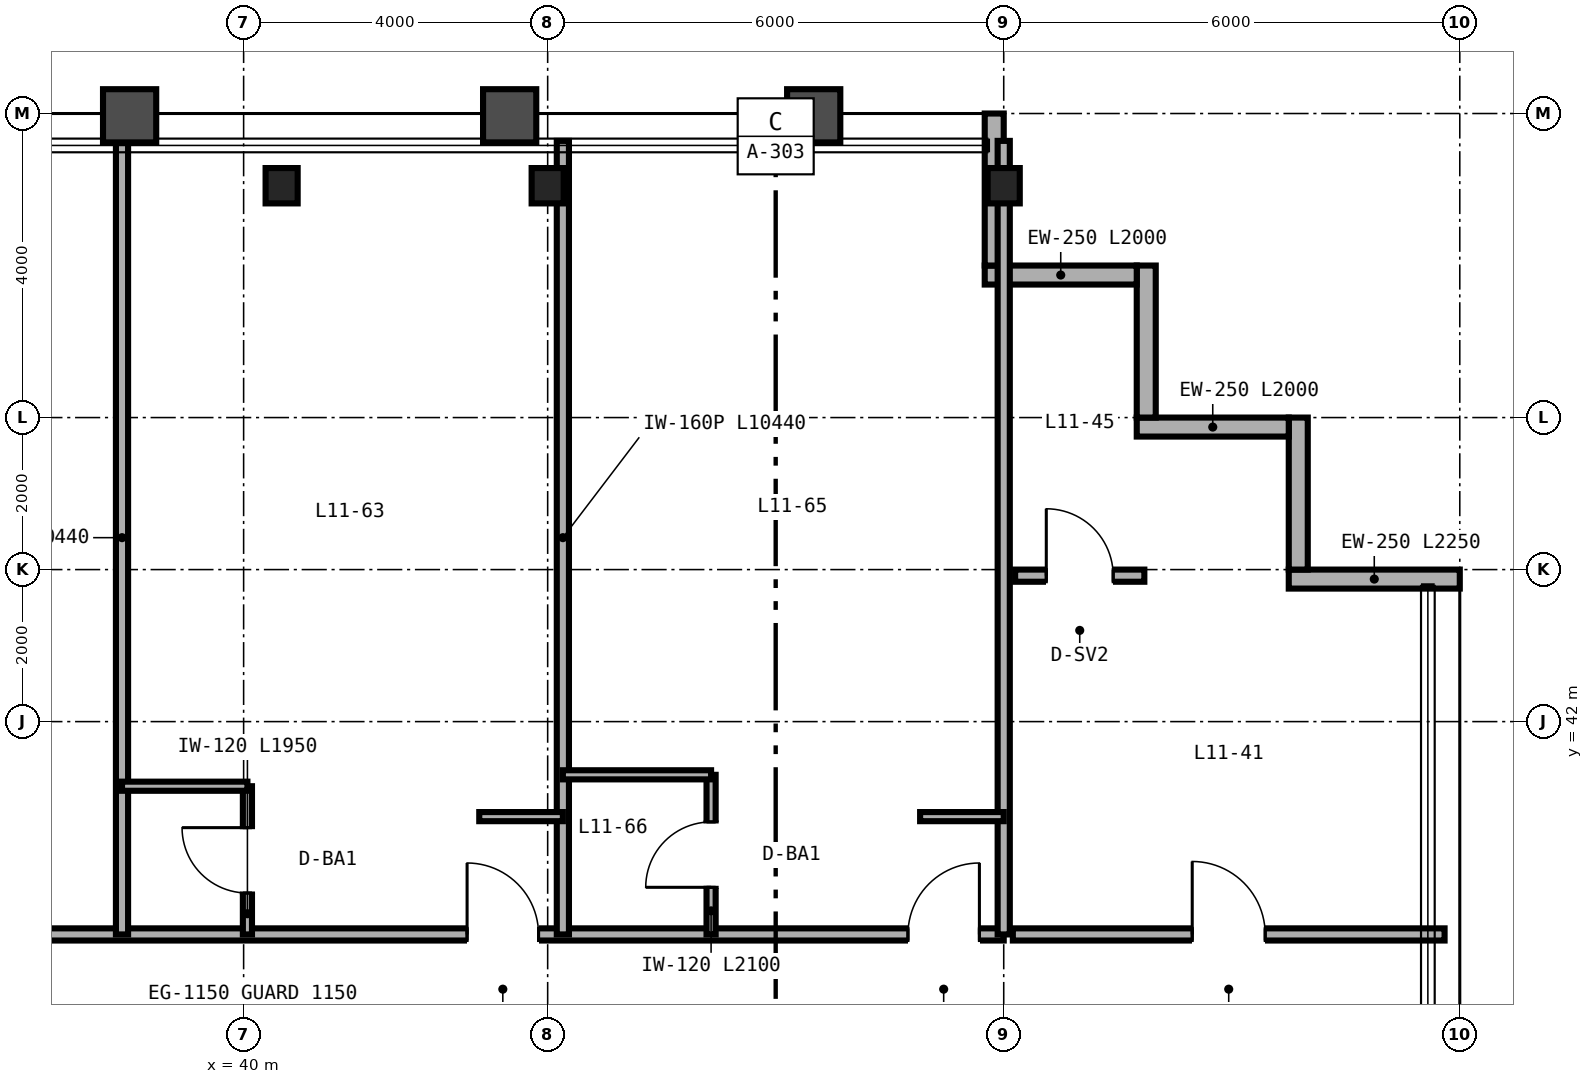
"""IFC4 building model, lengths in metres.
Left out: names, types, materials, properties, quantities, classifications, styles, units other than length and angle.
Written with IfcOpenShell. Run it as: python <this file> out.ifc"""

import sys

from ifc_helpers import new_model, si_unit, direction, frame, frame_2d, origin, origin_2d, place, context, subcontext, project, spatial, rectangle, i_section, extrude, source, transform, mapped, element, fill, save


model = new_model("IFC4")
c1 = context("Model", 3, precision=1e-05, world=origin(), true_north=direction((0.0, 1.0)))
c2 = subcontext(c1, "Body", "Model", "MODEL_VIEW")
j1 = project(units=[si_unit("LENGTHUNIT", "METRE"), si_unit("PLANEANGLEUNIT", "RADIAN")], contexts=[c1])
p1 = place(None, origin())
s1 = spatial("IfcSite", under=j1, at=p1, CompositionType="ELEMENT")
p2 = place(p1, origin())
s2 = spatial("IfcBuilding", under=s1, at=p2, CompositionType="ELEMENT")
p3 = place(p2, frame((0.0, 0.0, 49.2)))
s3 = spatial("IfcBuildingStorey", under=s2, at=p3, CompositionType="ELEMENT", Elevation=49.2)
m1 = source(origin(), c2, "Body", "SweptSolid", [
    extrude(i_section(OverallWidth=0.422, OverallDepth=0.465, WebThickness=0.045, FlangeThickness=0.073, FilletRadius=0.025, at=origin_2d()), origin(), (0.0, 0.0, 1.0), 3.35),
])
for number, where, z_axis, x_axis in (
    (1, (40.5, 49.05, 0.0), (0.0, 0.0, 1.0), (1.0, 0.0, 0.0)),
    (2, (44.0, 49.05, 0.0), (0.0, 0.0, 1.0), (1.0, 0.0, 0.0)),
    (3, (50.0, 49.05, 0.0), (0.0, 0.0, 1.0), (1.0, 0.0, 0.0)),
):
    element("IfcColumn", number, at=place(p3, frame(where, z_axis=z_axis, x_axis=x_axis)), inside=s3, PredefinedType="COLUMN", context=c2, shape_type="MappedRepresentation", body=[
        mapped(m1, transform((0.0, 0.0, 0.0), scale=1.0)),
    ])
p4 = place(p3, frame((56.0, 43.875, 0.0), z_axis=(0.0, 0.0, 1.0), x_axis=(-1.0, 0.0, 0.0)))
e4 = element("IfcWall", 4, at=p4, inside=s3, PredefinedType="SOLIDWALL", context=c2, shape_type="SweptSolid", body=[
    extrude(rectangle(XDim=2.25, YDim=0.25, at=frame_2d((1.125, 0.0))), origin(), (0.0, 0.0, 1.0), 3.35),
])
for number, where, z_axis, x_axis in (
    (5, (53.875, 44.0, 0.0), (0.0, 0.0, 1.0), (0.0, 1.0, 0.0)),
    (6, (53.75, 45.875, 0.0), (0.0, 0.0, 1.0), (-1.0, 0.0, 0.0)),
    (7, (51.875, 46.0, 0.0), (0.0, 0.0, 1.0), (0.0, 1.0, 0.0)),
    (8, (51.75, 47.875, 0.0), (0.0, 0.0, 1.0), (-1.0, 0.0, 0.0)),
):
    element("IfcWall", number, at=place(p3, frame(where, z_axis=z_axis, x_axis=x_axis)), inside=s3, PredefinedType="SOLIDWALL", context=c2, shape_type="SweptSolid", body=[
        extrude(rectangle(XDim=2.0, YDim=0.25, at=frame_2d((1.0, 0.0))), origin(), (0.0, 0.0, 1.0), 3.35),
    ])
p5 = place(p3, frame((49.875, 48.0, 0.0), z_axis=(0.0, 0.0, 1.0), x_axis=(0.0, 1.0, 0.0)))
e9 = element("IfcWall", 9, at=p5, inside=s3, PredefinedType="SOLIDWALL", context=c2, shape_type="SweptSolid", body=[
    extrude(rectangle(XDim=2.0, YDim=0.25, at=frame_2d((1.0, 0.0))), origin(), (0.0, 0.0, 1.0), 2.657),
])
p6 = place(p3, frame((50.12, 39.2, 0.0), z_axis=(0.0, 0.0, 1.0), x_axis=(1.0, 0.0, 0.0)))
e10 = element("IfcWall", 10, at=p6, inside=s3, PredefinedType="PARTITIONING", context=c2, shape_type="SweptSolid", body=[
    extrude(rectangle(XDim=5.68, YDim=0.16, at=frame_2d((2.84, 0.0))), origin(), (0.0, 0.0, 1.0), 3.35),
])
p7 = place(p6, frame((2.36, 0.0, 0.0)))
e11 = element("IfcOpeningElement", 11, at=p7, cuts=e10, PredefinedType="OPENING", context=c2, shape_type="SweptSolid", body=[
    extrude(rectangle(XDim=0.96, YDim=2.15, at=frame_2d((0.48, 1.075))), frame((0.0, 0.09, 0.0), z_axis=(0.0, -1.0, 0.0), x_axis=(1.0, 0.0, 0.0)), (0.0, 0.0, 1.0), 0.18),
])
p8 = place(p3, frame((50.15, 43.92, 0.0), z_axis=(0.0, 0.0, 1.0), x_axis=(1.0, 0.0, 0.0)))
e12 = element("IfcWall", 12, at=p8, inside=s3, PredefinedType="PARTITIONING", context=c2, shape_type="SweptSolid", body=[
    extrude(rectangle(XDim=1.7, YDim=0.16, at=frame_2d((0.85, 0.0))), origin(), (0.0, 0.0, 1.0), 3.35),
])
p9 = place(p8, frame((0.41, 0.0, 0.0)))
e13 = element("IfcOpeningElement", 13, at=p9, cuts=e12, PredefinedType="OPENING", context=c2, shape_type="SweptSolid", body=[
    extrude(rectangle(XDim=0.88, YDim=2.15, at=frame_2d((0.44, 1.075))), frame((0.0, 0.09, 0.0), z_axis=(0.0, -1.0, 0.0), x_axis=(1.0, 0.0, 0.0)), (0.0, 0.0, 1.0), 0.18),
])
p10 = place(p3, frame((14.0, 39.2, 0.0), z_axis=(0.0, 0.0, 1.0), x_axis=(1.0, 0.0, 0.0)))
e14 = element("IfcWall", 14, at=p10, inside=s3, PredefinedType="PARTITIONING", context=c2, shape_type="SweptSolid", body=[
    extrude(rectangle(XDim=36.0, YDim=0.16, at=frame_2d((18.0, 0.0))), origin(), (0.0, 0.0, 1.0), 2.571),
])
p11 = place(p10, frame((4.54, 0.0, 0.0)))
e15 = element("IfcOpeningElement", 15, at=p11, cuts=e14, PredefinedType="OPENING", context=c2, shape_type="SweptSolid", body=[
    extrude(rectangle(XDim=0.94, YDim=2.15, at=frame_2d((0.47, 1.075))), frame((0.0, 0.09, 0.0), z_axis=(0.0, -1.0, 0.0), x_axis=(1.0, 0.0, 0.0)), (0.0, 0.0, 1.0), 0.18),
])
p12 = place(p10, frame((10.29, 0.0, 0.0)))
e16 = element("IfcOpeningElement", 16, at=p12, cuts=e14, PredefinedType="OPENING", context=c2, shape_type="SweptSolid", body=[
    extrude(rectangle(XDim=0.94, YDim=2.15, at=frame_2d((0.47, 1.075))), frame((0.0, 0.09, 0.0), z_axis=(0.0, -1.0, 0.0), x_axis=(1.0, 0.0, 0.0)), (0.0, 0.0, 1.0), 0.18),
])
p13 = place(p10, frame((16.54, 0.0, 0.0)))
e17 = element("IfcOpeningElement", 17, at=p13, cuts=e14, PredefinedType="OPENING", context=c2, shape_type="SweptSolid", body=[
    extrude(rectangle(XDim=0.94, YDim=2.15, at=frame_2d((0.47, 1.075))), frame((0.0, 0.09, 0.0), z_axis=(0.0, -1.0, 0.0), x_axis=(1.0, 0.0, 0.0)), (0.0, 0.0, 1.0), 0.18),
])
p14 = place(p10, frame((20.62, 0.0, 0.0)))
e18 = element("IfcOpeningElement", 18, at=p14, cuts=e14, PredefinedType="OPENING", context=c2, shape_type="SweptSolid", body=[
    extrude(rectangle(XDim=0.96, YDim=2.15, at=frame_2d((0.48, 1.075))), frame((0.0, 0.09, 0.0), z_axis=(0.0, -1.0, 0.0), x_axis=(1.0, 0.0, 0.0)), (0.0, 0.0, 1.0), 0.18),
])
p15 = place(p10, frame((28.94, 0.0, 0.0)))
e19 = element("IfcOpeningElement", 19, at=p15, cuts=e14, PredefinedType="OPENING", context=c2, shape_type="SweptSolid", body=[
    extrude(rectangle(XDim=0.94, YDim=2.15, at=frame_2d((0.47, 1.075))), frame((0.0, 0.09, 0.0), z_axis=(0.0, -1.0, 0.0), x_axis=(1.0, 0.0, 0.0)), (0.0, 0.0, 1.0), 0.18),
])
p16 = place(p10, frame((34.74, 0.0, 0.0)))
e20 = element("IfcOpeningElement", 20, at=p16, cuts=e14, PredefinedType="OPENING", context=c2, shape_type="SweptSolid", body=[
    extrude(rectangle(XDim=0.94, YDim=2.15, at=frame_2d((0.47, 1.075))), frame((0.0, 0.09, 0.0), z_axis=(0.0, -1.0, 0.0), x_axis=(1.0, 0.0, 0.0)), (0.0, 0.0, 1.0), 0.18),
])
p17 = place(p3, frame((50.0, 39.2, 0.0), z_axis=(0.0, 0.0, 1.0), x_axis=(0.0, 1.0, 0.0)))
e21 = element("IfcWall", 21, at=p17, inside=s3, PredefinedType="PARTITIONING", context=c2, shape_type="SweptSolid", body=[
    extrude(rectangle(XDim=10.44, YDim=0.16, at=frame_2d((5.22, 0.0))), origin(), (0.0, 0.0, 1.0), 2.657),
])
p18 = place(p3, frame((38.4, 39.2, 0.0), z_axis=(0.0, 0.0, 1.0), x_axis=(0.0, 1.0, 0.0)))
e22 = element("IfcWall", 22, at=p18, inside=s3, PredefinedType="PARTITIONING", context=c2, shape_type="SweptSolid", body=[
    extrude(rectangle(XDim=10.44, YDim=0.16, at=frame_2d((5.22, 0.0))), origin(), (0.0, 0.0, 1.0), 2.423),
])
p19 = place(p3, frame((44.2, 39.2, 0.0), z_axis=(0.0, 0.0, 1.0), x_axis=(0.0, 1.0, 0.0)))
e23 = element("IfcWall", 23, at=p19, inside=s3, PredefinedType="PARTITIONING", context=c2, shape_type="SweptSolid", body=[
    extrude(rectangle(XDim=10.44, YDim=0.16, at=frame_2d((5.22, 0.0))), origin(), (0.0, 0.0, 1.0), 2.657),
])
p20 = place(p3, frame((40.05, 39.2, 0.0), z_axis=(0.0, 0.0, 1.0), x_axis=(0.0, 1.0, 0.0)))
e24 = element("IfcWall", 24, at=p20, inside=s3, PredefinedType="PARTITIONING", context=c2, shape_type="SweptSolid", body=[
    extrude(rectangle(XDim=1.95, YDim=0.12, at=frame_2d((0.975, 0.0))), origin(), (0.0, 0.0, 1.0), 3.35),
])
p21 = place(p20, frame((0.545, 0.0, 0.0)))
e25 = element("IfcOpeningElement", 25, at=p21, cuts=e24, PredefinedType="OPENING", context=c2, shape_type="SweptSolid", body=[
    extrude(rectangle(XDim=0.86, YDim=2.1, at=frame_2d((0.43, 1.05))), frame((0.0, 0.07, 0.0), z_axis=(0.0, -1.0, 0.0), x_axis=(1.0, 0.0, 0.0)), (0.0, 0.0, 1.0), 0.14),
])
p22 = place(p3, frame((38.4, 41.15, 0.0), z_axis=(0.0, 0.0, 1.0), x_axis=(1.0, 0.0, 0.0)))
e26 = element("IfcWall", 26, at=p22, inside=s3, PredefinedType="PARTITIONING", context=c2, shape_type="SweptSolid", body=[
    extrude(rectangle(XDim=1.65, YDim=0.12, at=frame_2d((0.825, 0.0))), origin(), (0.0, 0.0, 1.0), 3.35),
])
p23 = place(p3, frame((43.1, 40.75, 0.0), z_axis=(0.0, 0.0, 1.0), x_axis=(1.0, 0.0, 0.0)))
e27 = element("IfcWall", 27, at=p23, inside=s3, PredefinedType="PARTITIONING", context=c2, shape_type="SweptSolid", body=[
    extrude(rectangle(XDim=1.1, YDim=0.12, at=frame_2d((0.55, 0.0))), origin(), (0.0, 0.0, 1.0), 3.35),
])
p24 = place(p3, frame((46.15, 39.2, 0.0), z_axis=(0.0, 0.0, 1.0), x_axis=(0.0, 1.0, 0.0)))
e28 = element("IfcWall", 28, at=p24, inside=s3, PredefinedType="PARTITIONING", context=c2, shape_type="SweptSolid", body=[
    extrude(rectangle(XDim=2.1, YDim=0.12, at=frame_2d((1.05, 0.0))), origin(), (0.0, 0.0, 1.0), 3.35),
])
p25 = place(p24, frame((0.62, 0.0, 0.0)))
e29 = element("IfcOpeningElement", 29, at=p25, cuts=e28, PredefinedType="OPENING", context=c2, shape_type="SweptSolid", body=[
    extrude(rectangle(XDim=0.86, YDim=2.1, at=frame_2d((0.43, 1.05))), frame((0.0, 0.07, 0.0), z_axis=(0.0, -1.0, 0.0), x_axis=(1.0, 0.0, 0.0)), (0.0, 0.0, 1.0), 0.14),
])
p26 = place(p3, frame((44.2, 41.3, 0.0), z_axis=(0.0, 0.0, 1.0), x_axis=(1.0, 0.0, 0.0)))
e30 = element("IfcWall", 30, at=p26, inside=s3, PredefinedType="PARTITIONING", context=c2, shape_type="SweptSolid", body=[
    extrude(rectangle(XDim=1.95, YDim=0.12, at=frame_2d((0.975, 0.0))), origin(), (0.0, 0.0, 1.0), 3.35),
])
p27 = place(p3, frame((48.9, 40.75, 0.0), z_axis=(0.0, 0.0, 1.0), x_axis=(1.0, 0.0, 0.0)))
e31 = element("IfcWall", 31, at=p27, inside=s3, PredefinedType="PARTITIONING", context=c2, shape_type="SweptSolid", body=[
    extrude(rectangle(XDim=1.1, YDim=0.12, at=frame_2d((0.55, 0.0))), origin(), (0.0, 0.0, 1.0), 3.35),
])
m2 = source(origin(), c2, "Body", "SweptSolid", [
    extrude(rectangle(XDim=0.96, YDim=2.15, at=frame_2d((0.48, 1.075))), frame((0.0, 0.025, 0.0), z_axis=(0.0, -1.0, 0.0), x_axis=(1.0, 0.0, 0.0)), (0.0, 0.0, 1.0), 0.05),
])
p28 = place(p7, origin())
e32 = element("IfcDoor", 32, at=p28, inside=s3, OperationType="SINGLE_SWING_LEFT", PredefinedType="DOOR", context=c2, shape_type="MappedRepresentation", body=[
    mapped(m2, transform((0.0, 0.0, 0.0), scale=1.0)),
])
fill(e11, e32)
m3 = source(origin(), c2, "Body", "SweptSolid", [
    extrude(rectangle(XDim=0.88, YDim=2.15, at=frame_2d((0.44, 1.075))), frame((0.0, 0.025, 0.0), z_axis=(0.0, -1.0, 0.0), x_axis=(1.0, 0.0, 0.0)), (0.0, 0.0, 1.0), 0.05),
])
p29 = place(p9, origin())
e33 = element("IfcDoor", 33, at=p29, inside=s3, OperationType="SINGLE_SWING_LEFT", PredefinedType="DOOR", context=c2, shape_type="MappedRepresentation", body=[
    mapped(m3, transform((0.0, 0.0, 0.0), scale=1.0)),
])
fill(e13, e33)
m4 = source(origin(), c2, "Body", "SweptSolid", [
    extrude(rectangle(XDim=0.86, YDim=2.1, at=frame_2d((0.43, 1.05))), frame((0.0, 0.025, 0.0), z_axis=(0.0, -1.0, 0.0), x_axis=(1.0, 0.0, 0.0)), (0.0, 0.0, 1.0), 0.05),
])
p30 = place(p21, origin())
e34 = element("IfcDoor", 34, at=p30, inside=s3, OperationType="SINGLE_SWING_RIGHT", PredefinedType="DOOR", context=c2, shape_type="MappedRepresentation", body=[
    mapped(m4, transform((0.0, 0.0, 0.0), scale=1.0)),
])
fill(e25, e34)
p31 = place(p25, origin())
e35 = element("IfcDoor", 35, at=p31, inside=s3, OperationType="SINGLE_SWING_LEFT", PredefinedType="DOOR", context=c2, shape_type="MappedRepresentation", body=[
    mapped(m4, transform((0.0, 0.0, 0.0), scale=1.0)),
])
fill(e29, e35)
m5 = source(origin(), c2, "Body", "SweptSolid", [
    extrude(rectangle(XDim=0.94, YDim=2.15, at=frame_2d((0.47, 1.075))), frame((0.0, 0.025, 0.0), z_axis=(0.0, -1.0, 0.0), x_axis=(1.0, 0.0, 0.0)), (0.0, 0.0, 1.0), 0.05),
])
p32 = place(p15, origin())
e36 = element("IfcDoor", 36, at=p32, inside=s3, OperationType="SINGLE_SWING_LEFT", PredefinedType="DOOR", context=c2, shape_type="MappedRepresentation", body=[
    mapped(m5, transform((0.0, 0.0, 0.0), scale=1.0)),
])
fill(e19, e36)
p33 = place(p16, origin())
e37 = element("IfcDoor", 37, at=p33, inside=s3, OperationType="SINGLE_SWING_RIGHT", PredefinedType="DOOR", context=c2, shape_type="MappedRepresentation", body=[
    mapped(m5, transform((0.0, 0.0, 0.0), scale=1.0)),
])
fill(e20, e37)
save(model, sys.argv[1])
